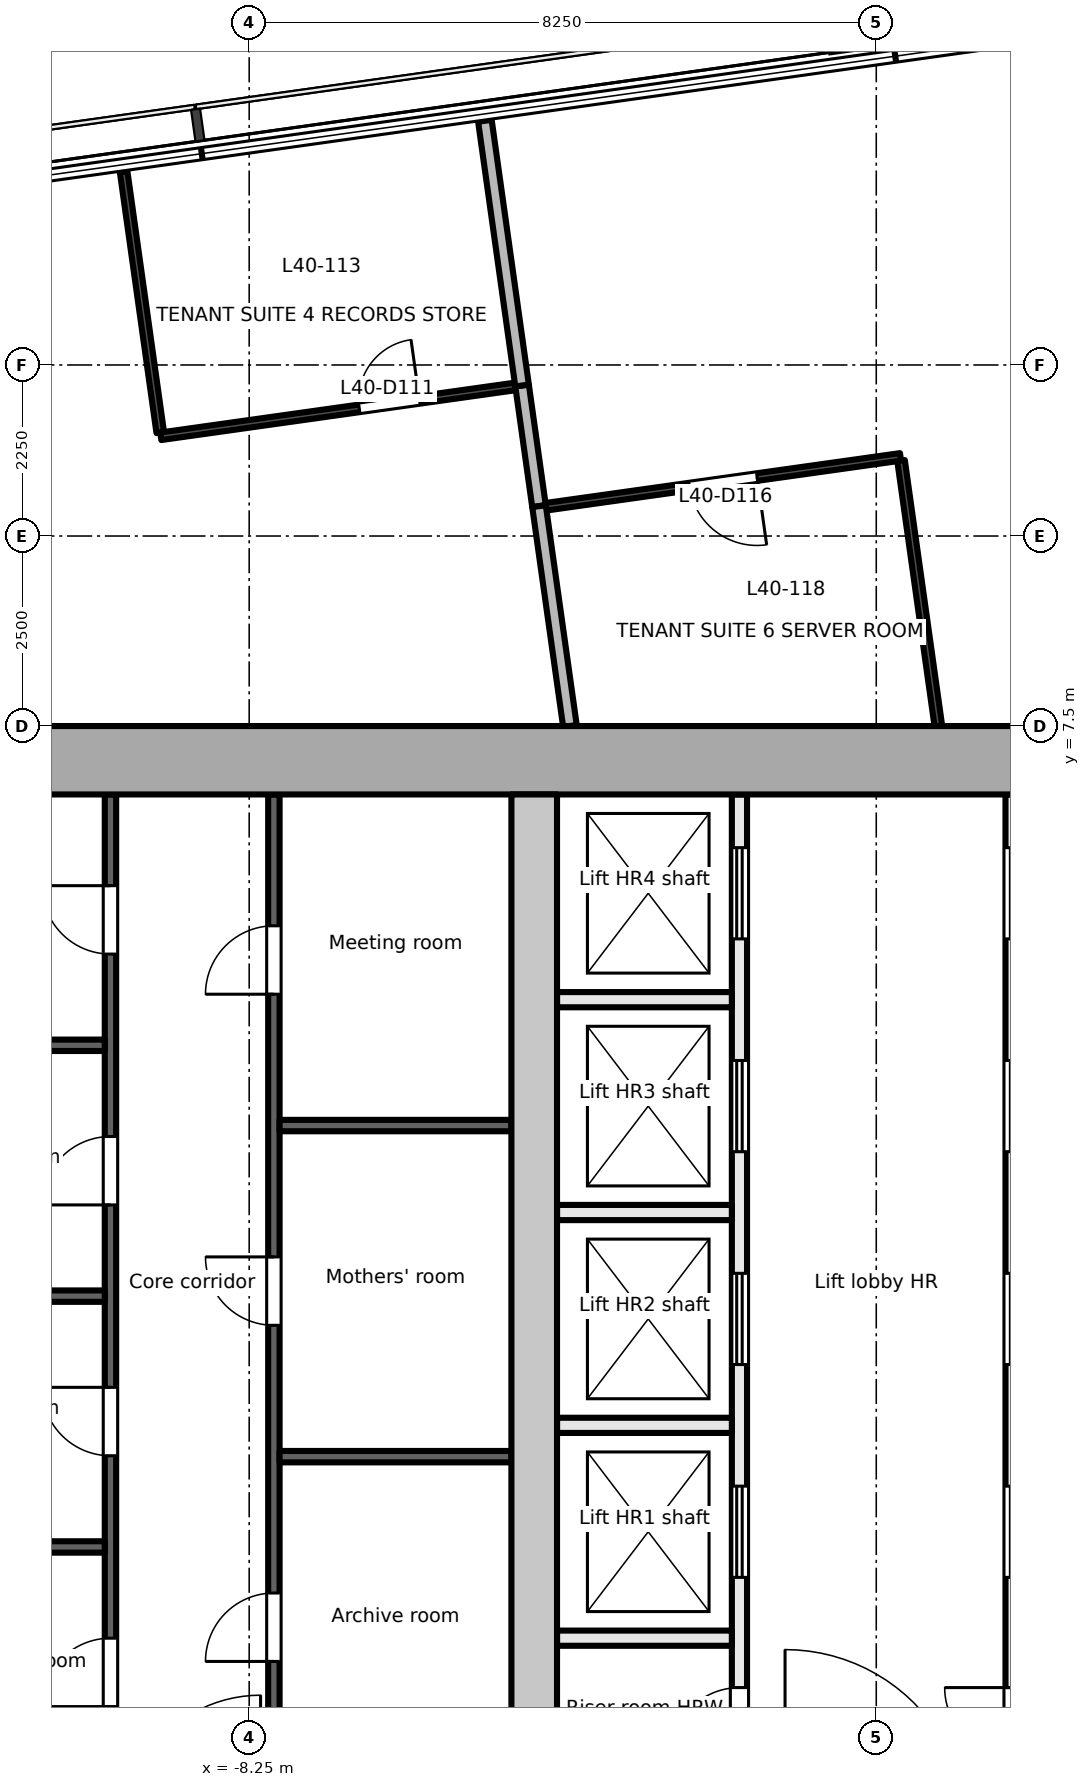
"""IFC4 building model, lengths in metres.
Left out: names, types, materials, properties, quantities, classifications, styles, units other than length and angle.
Written with IfcOpenShell. Run it as: python <this file> out.ifc"""

import sys

from ifc_helpers import new_model, si_unit, direction, frame, frame_2d, origin, origin_2d, place, context, subcontext, project, spatial, rectangle, extrude, element, fill, save


model = new_model("IFC4")
c1 = context("Model", 3, precision=1e-05, world=origin(), true_north=direction((0.0, 1.0)))
c2 = subcontext(c1, "Body", "Model", "MODEL_VIEW")
j1 = project(units=[si_unit("LENGTHUNIT", "METRE"), si_unit("PLANEANGLEUNIT", "RADIAN")], contexts=[c1])
p1 = place(None, origin())
s1 = spatial("IfcSite", under=j1, at=p1, CompositionType="ELEMENT")
p2 = place(p1, origin())
s2 = spatial("IfcBuilding", under=s1, at=p2, CompositionType="ELEMENT")
p3 = place(p2, frame((0.0, 0.0, 176.3)))
s3 = spatial("IfcBuildingStorey", under=s2, at=p3, CompositionType="ELEMENT", Elevation=176.3)
p4 = place(p3, frame((-0.125, 17.34, -0.2), z_axis=(0.0, 0.0, 1.0), x_axis=(0.99027049762, 0.139155817501, 0.0)))
e1 = element("IfcColumn", 1, at=p4, inside=s3, PredefinedType="COLUMN", context=c2, shape_type="SweptSolid", body=[
    extrude(rectangle(XDim=1.2, YDim=1.8, at=origin_2d()), origin(), (0.0, 0.0, 1.0), 3.9),
])
p5 = place(p3, frame((-18.0, 7.05, -0.2), z_axis=(0.0, 0.0, 1.0), x_axis=(1.0, 0.0, 0.0)))
e2 = element("IfcWall", 2, at=p5, inside=s3, PredefinedType="SHEAR", context=c2, shape_type="SweptSolid", body=[
    extrude(rectangle(XDim=36.0, YDim=0.9, at=frame_2d((18.0, 0.0))), origin(), (0.0, 0.0, 1.0), 3.9),
])
p6 = place(p3, frame((-4.5, -6.6, -0.2), z_axis=(0.0, 0.0, 1.0), x_axis=(0.0, 1.0, 0.0)))
e3 = element("IfcWall", 3, at=p6, inside=s3, PredefinedType="SHEAR", context=c2, shape_type="SweptSolid", body=[
    extrude(rectangle(XDim=13.2, YDim=0.6, at=frame_2d((6.6, 0.0))), origin(), (0.0, 0.0, 1.0), 3.9),
])
p7 = place(p3, frame((-10.075, -6.6, 0.0), z_axis=(0.0, 0.0, 1.0), x_axis=(0.0, 1.0, 0.0)))
e4 = element("IfcWall", 4, at=p7, inside=s3, PredefinedType="PARTITIONING", context=c2, shape_type="SweptSolid", body=[
    extrude(rectangle(XDim=13.2, YDim=0.15, at=frame_2d((6.6, 0.0))), origin(), (0.0, 0.0, 1.0), 3.7),
])
p8 = place(p7, frame((1.2, 0.0, 0.0)))
e5 = element("IfcOpeningElement", 5, at=p8, cuts=e4, PredefinedType="OPENING", context=c2, shape_type="SweptSolid", body=[
    extrude(rectangle(XDim=0.9, YDim=2.1, at=frame_2d((0.45, 1.05))), frame((0.0, 0.085, 0.0), z_axis=(0.0, -1.0, 0.0), x_axis=(1.0, 0.0, 0.0)), (0.0, 0.0, 1.0), 0.171),
])
p9 = place(p7, frame((4.5, 0.0, 0.0)))
e6 = element("IfcOpeningElement", 6, at=p9, cuts=e4, PredefinedType="OPENING", context=c2, shape_type="SweptSolid", body=[
    extrude(rectangle(XDim=0.9, YDim=2.1, at=frame_2d((0.45, 1.05))), frame((0.0, 0.085, 0.0), z_axis=(0.0, -1.0, 0.0), x_axis=(1.0, 0.0, 0.0)), (0.0, 0.0, 1.0), 0.171),
])
p10 = place(p7, frame((7.8, 0.0, 0.0)))
e7 = element("IfcOpeningElement", 7, at=p10, cuts=e4, PredefinedType="OPENING", context=c2, shape_type="SweptSolid", body=[
    extrude(rectangle(XDim=0.9, YDim=2.1, at=frame_2d((0.45, 1.05))), frame((0.0, 0.085, 0.0), z_axis=(0.0, -1.0, 0.0), x_axis=(1.0, 0.0, 0.0)), (0.0, 0.0, 1.0), 0.171),
])
p11 = place(p7, frame((11.1, 0.0, 0.0)))
e8 = element("IfcOpeningElement", 8, at=p11, cuts=e4, PredefinedType="OPENING", context=c2, shape_type="SweptSolid", body=[
    extrude(rectangle(XDim=0.9, YDim=2.1, at=frame_2d((0.45, 1.05))), frame((0.0, 0.085, 0.0), z_axis=(0.0, -1.0, 0.0), x_axis=(1.0, 0.0, 0.0)), (0.0, 0.0, 1.0), 0.171),
])
for number, where, z_axis, x_axis in (
    (9, (-13.2, -3.3, 0.0), (0.0, 0.0, 1.0), (1.0, 0.0, 0.0)),
    (10, (-13.2, 0.0, 0.0), (0.0, 0.0, 1.0), (1.0, 0.0, 0.0)),
    (11, (-13.2, 3.3, 0.0), (0.0, 0.0, 1.0), (1.0, 0.0, 0.0)),
):
    element("IfcWall", number, at=place(p3, frame(where, z_axis=z_axis, x_axis=x_axis)), inside=s3, PredefinedType="PARTITIONING", context=c2, shape_type="SweptSolid", body=[
        extrude(rectangle(XDim=3.05, YDim=0.15, at=frame_2d((1.525, 0.0))), origin(), (0.0, 0.0, 1.0), 3.7),
    ])
p12 = place(p3, frame((-7.925, -6.6, 0.0), z_axis=(0.0, 0.0, 1.0), x_axis=(0.0, 1.0, 0.0)))
e12 = element("IfcWall", 12, at=p12, inside=s3, PredefinedType="PARTITIONING", context=c2, shape_type="SweptSolid", body=[
    extrude(rectangle(XDim=13.2, YDim=0.15, at=frame_2d((6.6, 0.0))), origin(), (0.0, 0.0, 1.0), 3.7),
])
p13 = place(p12, frame((1.794, 0.0, 0.0)))
e13 = element("IfcOpeningElement", 13, at=p13, cuts=e12, PredefinedType="OPENING", context=c2, shape_type="SweptSolid", body=[
    extrude(rectangle(XDim=0.9, YDim=2.1, at=frame_2d((0.45, 1.05))), frame((0.0, 0.085, 0.0), z_axis=(0.0, -1.0, 0.0), x_axis=(1.0, 0.0, 0.0)), (0.0, 0.0, 1.0), 0.171),
])
p14 = place(p12, frame((6.216, 0.0, 0.0)))
e14 = element("IfcOpeningElement", 14, at=p14, cuts=e12, PredefinedType="OPENING", context=c2, shape_type="SweptSolid", body=[
    extrude(rectangle(XDim=0.9, YDim=2.1, at=frame_2d((0.45, 1.05))), frame((0.0, 0.085, 0.0), z_axis=(0.0, -1.0, 0.0), x_axis=(1.0, 0.0, 0.0)), (0.0, 0.0, 1.0), 0.171),
])
p15 = place(p12, frame((10.572, 0.0, 0.0)))
e15 = element("IfcOpeningElement", 15, at=p15, cuts=e12, PredefinedType="OPENING", context=c2, shape_type="SweptSolid", body=[
    extrude(rectangle(XDim=0.9, YDim=2.1, at=frame_2d((0.45, 1.05))), frame((0.0, 0.085, 0.0), z_axis=(0.0, -1.0, 0.0), x_axis=(1.0, 0.0, 0.0)), (0.0, 0.0, 1.0), 0.171),
])
for number, where, z_axis, x_axis in (
    (16, (-7.85, -2.112, 0.0), (0.0, 0.0, 1.0), (1.0, 0.0, 0.0)),
    (17, (-7.85, 2.244, 0.0), (0.0, 0.0, 1.0), (1.0, 0.0, 0.0)),
):
    element("IfcWall", number, at=place(p3, frame(where, z_axis=z_axis, x_axis=x_axis)), inside=s3, PredefinedType="PARTITIONING", context=c2, shape_type="SweptSolid", body=[
        extrude(rectangle(XDim=3.05, YDim=0.15, at=frame_2d((1.525, 0.0))), origin(), (0.0, 0.0, 1.0), 3.7),
    ])
p16 = place(p3, frame((-1.8, -6.6, 0.0), z_axis=(0.0, 0.0, 1.0), x_axis=(0.0, 1.0, 0.0)))
e18 = element("IfcWall", 18, at=p16, inside=s3, PredefinedType="PARTITIONING", context=c2, shape_type="SweptSolid", body=[
    extrude(rectangle(XDim=13.2, YDim=0.2, at=frame_2d((6.6, 0.0))), origin(), (0.0, 0.0, 1.0), 3.7),
])
p17 = place(p16, frame((0.55, 0.0, 0.0)))
e19 = element("IfcOpeningElement", 19, at=p17, cuts=e18, PredefinedType="OPENING", context=c2, shape_type="SweptSolid", body=[
    extrude(rectangle(XDim=0.9, YDim=2.1, at=frame_2d((0.45, 1.05))), frame((0.0, 0.111, 0.0), z_axis=(0.0, -1.0, 0.0), x_axis=(1.0, 0.0, 0.0)), (0.0, 0.0, 1.0), 0.221),
])
p18 = place(p16, frame((2.9, 0.0, 0.0)))
e20 = element("IfcOpeningElement", 20, at=p18, cuts=e18, PredefinedType="OPENING", context=c2, shape_type="SweptSolid", body=[
    extrude(rectangle(XDim=1.2, YDim=2.1, at=frame_2d((0.6, 1.05))), frame((0.0, 0.111, 0.0), z_axis=(0.0, -1.0, 0.0), x_axis=(1.0, 0.0, 0.0)), (0.0, 0.0, 1.0), 0.221),
])
p19 = place(p16, frame((5.7, 0.0, 0.0)))
e21 = element("IfcOpeningElement", 21, at=p19, cuts=e18, PredefinedType="OPENING", context=c2, shape_type="SweptSolid", body=[
    extrude(rectangle(XDim=1.2, YDim=2.1, at=frame_2d((0.6, 1.05))), frame((0.0, 0.111, 0.0), z_axis=(0.0, -1.0, 0.0), x_axis=(1.0, 0.0, 0.0)), (0.0, 0.0, 1.0), 0.221),
])
p20 = place(p16, frame((8.5, 0.0, 0.0)))
e22 = element("IfcOpeningElement", 22, at=p20, cuts=e18, PredefinedType="OPENING", context=c2, shape_type="SweptSolid", body=[
    extrude(rectangle(XDim=1.2, YDim=2.1, at=frame_2d((0.6, 1.05))), frame((0.0, 0.111, 0.0), z_axis=(0.0, -1.0, 0.0), x_axis=(1.0, 0.0, 0.0)), (0.0, 0.0, 1.0), 0.221),
])
p21 = place(p16, frame((11.3, 0.0, 0.0)))
e23 = element("IfcOpeningElement", 23, at=p21, cuts=e18, PredefinedType="OPENING", context=c2, shape_type="SweptSolid", body=[
    extrude(rectangle(XDim=1.2, YDim=2.1, at=frame_2d((0.6, 1.05))), frame((0.0, 0.111, 0.0), z_axis=(0.0, -1.0, 0.0), x_axis=(1.0, 0.0, 0.0)), (0.0, 0.0, 1.0), 0.221),
])
p22 = place(p3, frame((1.8, -6.6, 0.0), z_axis=(0.0, 0.0, 1.0), x_axis=(0.0, 1.0, 0.0)))
e24 = element("IfcWall", 24, at=p22, inside=s3, PredefinedType="PARTITIONING", context=c2, shape_type="SweptSolid", body=[
    extrude(rectangle(XDim=13.2, YDim=0.2, at=frame_2d((6.6, 0.0))), origin(), (0.0, 0.0, 1.0), 3.7),
])
p23 = place(p22, frame((0.55, 0.0, 0.0)))
e25 = element("IfcOpeningElement", 25, at=p23, cuts=e24, PredefinedType="OPENING", context=c2, shape_type="SweptSolid", body=[
    extrude(rectangle(XDim=0.9, YDim=2.1, at=frame_2d((0.45, 1.05))), frame((0.0, 0.111, 0.0), z_axis=(0.0, -1.0, 0.0), x_axis=(1.0, 0.0, 0.0)), (0.0, 0.0, 1.0), 0.221),
])
p24 = place(p22, frame((2.9, 0.0, 0.0)))
e26 = element("IfcOpeningElement", 26, at=p24, cuts=e24, PredefinedType="OPENING", context=c2, shape_type="SweptSolid", body=[
    extrude(rectangle(XDim=1.2, YDim=2.1, at=frame_2d((0.6, 1.05))), frame((0.0, 0.111, 0.0), z_axis=(0.0, -1.0, 0.0), x_axis=(1.0, 0.0, 0.0)), (0.0, 0.0, 1.0), 0.221),
])
p25 = place(p22, frame((5.7, 0.0, 0.0)))
e27 = element("IfcOpeningElement", 27, at=p25, cuts=e24, PredefinedType="OPENING", context=c2, shape_type="SweptSolid", body=[
    extrude(rectangle(XDim=1.2, YDim=2.1, at=frame_2d((0.6, 1.05))), frame((0.0, 0.111, 0.0), z_axis=(0.0, -1.0, 0.0), x_axis=(1.0, 0.0, 0.0)), (0.0, 0.0, 1.0), 0.221),
])
p26 = place(p22, frame((8.5, 0.0, 0.0)))
e28 = element("IfcOpeningElement", 28, at=p26, cuts=e24, PredefinedType="OPENING", context=c2, shape_type="SweptSolid", body=[
    extrude(rectangle(XDim=1.2, YDim=2.1, at=frame_2d((0.6, 1.05))), frame((0.0, 0.111, 0.0), z_axis=(0.0, -1.0, 0.0), x_axis=(1.0, 0.0, 0.0)), (0.0, 0.0, 1.0), 0.221),
])
p27 = place(p22, frame((11.3, 0.0, 0.0)))
e29 = element("IfcOpeningElement", 29, at=p27, cuts=e24, PredefinedType="OPENING", context=c2, shape_type="SweptSolid", body=[
    extrude(rectangle(XDim=1.2, YDim=2.1, at=frame_2d((0.6, 1.05))), frame((0.0, 0.111, 0.0), z_axis=(0.0, -1.0, 0.0), x_axis=(1.0, 0.0, 0.0)), (0.0, 0.0, 1.0), 0.221),
])
for number, where, z_axis, x_axis in (
    (30, (-4.2, -1.7, 0.0), (0.0, 0.0, 1.0), (1.0, 0.0, 0.0)),
    (31, (-4.2, 1.1, 0.0), (0.0, 0.0, 1.0), (1.0, 0.0, 0.0)),
    (32, (-4.2, 3.9, 0.0), (0.0, 0.0, 1.0), (1.0, 0.0, 0.0)),
    (33, (-4.2, -4.5, 0.0), (0.0, 0.0, 1.0), (1.0, 0.0, 0.0)),
):
    element("IfcWall", number, at=place(p3, frame(where, z_axis=z_axis, x_axis=x_axis)), inside=s3, PredefinedType="PARTITIONING", context=c2, shape_type="SweptSolid", body=[
        extrude(rectangle(XDim=2.3, YDim=0.2, at=frame_2d((1.15, 0.0))), origin(), (0.0, 0.0, 1.0), 3.7),
    ])
p28 = place(p3, frame((-9.902, 14.794, 0.0), z_axis=(0.0, 0.0, 1.0), x_axis=(0.139094045424, -0.990279176055, 0.0)))
e34 = element("IfcWall", 34, at=p28, inside=s3, PredefinedType="PARTITIONING", context=c2, shape_type="SweptSolid", body=[
    extrude(rectangle(XDim=3.467, YDim=0.1, at=frame_2d((1.733, 0.0))), origin(), (0.0, 0.0, 1.0), 3.7),
])
p29 = place(p3, frame((-9.413, 11.312, 0.0), z_axis=(0.0, 0.0, 1.0), x_axis=(0.99025300455, 0.139280246191, 0.0)))
e35 = element("IfcWall", 35, at=p29, inside=s3, PredefinedType="PARTITIONING", context=c2, shape_type="SweptSolid", body=[
    extrude(rectangle(XDim=4.71, YDim=0.1, at=frame_2d((2.355, 0.0))), origin(), (0.0, 0.0, 1.0), 3.3),
])
p30 = place(p29, frame((2.637, 0.0, 0.0)))
e36 = element("IfcOpeningElement", 36, at=p30, cuts=e35, PredefinedType="OPENING", context=c2, shape_type="SweptSolid", body=[
    extrude(rectangle(XDim=0.8, YDim=2.1, at=frame_2d((0.4, 1.05))), frame((0.0, 0.061, 0.0), z_axis=(0.0, -1.0, 0.0), x_axis=(1.0, 0.0, 0.0)), (0.0, 0.0, 1.0), 0.121),
])
p31 = place(p3, frame((-4.66, 11.98, 0.0), z_axis=(0.0, 0.0, 1.0), x_axis=(0.139096096116, -0.990278888013, 0.0)))
e37 = element("IfcWall", 37, at=p31, inside=s3, PredefinedType="PARTITIONING", context=c2, shape_type="SweptSolid", body=[
    extrude(rectangle(XDim=1.603, YDim=0.18, at=frame_2d((0.801, 0.0))), origin(), (0.0, 0.0, 1.0), 3.25),
])
p32 = place(p3, frame((-4.437, 10.393, 0.0), z_axis=(0.0, 0.0, 1.0), x_axis=(0.139303486007, -0.990249735565, 0.0)))
e38 = element("IfcWall", 38, at=p32, inside=s3, PredefinedType="PARTITIONING", context=c2, shape_type="SweptSolid", body=[
    extrude(rectangle(XDim=2.922, YDim=0.18, at=frame_2d((1.461, 0.0))), origin(), (0.0, 0.0, 1.0), 3.25),
])
p33 = place(p3, frame((-5.149, 15.463, 0.0), z_axis=(0.0, 0.0, 1.0), x_axis=(0.139039982937, -0.990286768136, 0.0)))
e39 = element("IfcWall", 39, at=p33, inside=s3, PredefinedType="PARTITIONING", context=c2, shape_type="SweptSolid", body=[
    extrude(rectangle(XDim=3.517, YDim=0.18, at=frame_2d((1.759, 0.0))), origin(), (0.0, 0.0, 1.0), 3.25),
])
p34 = place(p3, frame((0.319, 11.041, 0.0), z_axis=(0.0, 0.0, 1.0), x_axis=(-0.99025300455, -0.139280246191, 0.0)))
e40 = element("IfcWall", 40, at=p34, inside=s3, PredefinedType="PARTITIONING", context=c2, shape_type="SweptSolid", body=[
    extrude(rectangle(XDim=4.71, YDim=0.1, at=frame_2d((2.355, 0.0))), origin(), (0.0, 0.0, 1.0), 3.25),
])
p35 = place(p34, frame((1.905, 0.0, 0.0)))
e41 = element("IfcOpeningElement", 41, at=p35, cuts=e40, PredefinedType="OPENING", context=c2, shape_type="SweptSolid", body=[
    extrude(rectangle(XDim=0.9, YDim=2.1, at=frame_2d((0.45, 1.05))), frame((0.0, 0.061, 0.0), z_axis=(0.0, -1.0, 0.0), x_axis=(1.0, 0.0, 0.0)), (0.0, 0.0, 1.0), 0.121),
])
p36 = place(p3, frame((0.817, 7.5, 0.0), z_axis=(0.0, 0.0, 1.0), x_axis=(-0.139230432727, 0.990260009595, 0.0)))
e42 = element("IfcWall", 42, at=p36, inside=s3, PredefinedType="PARTITIONING", context=c2, shape_type="SweptSolid", body=[
    extrude(rectangle(XDim=3.526, YDim=0.1, at=frame_2d((1.763, 0.0))), origin(), (0.0, 0.0, 1.0), 3.7),
])
p37 = place(p8, origin())
e43 = element("IfcDoor", 43, at=p37, inside=s3, OperationType="SINGLE_SWING_LEFT", PredefinedType="DOOR", context=c2, shape_type="SweptSolid", body=[
    extrude(rectangle(XDim=0.9, YDim=2.1, at=frame_2d((0.45, 1.05))), frame((0.0, 0.025, 0.0), z_axis=(0.0, -1.0, 0.0), x_axis=(1.0, 0.0, 0.0)), (0.0, 0.0, 1.0), 0.05),
])
fill(e5, e43)
p38 = place(p9, origin())
e44 = element("IfcDoor", 44, at=p38, inside=s3, OperationType="SINGLE_SWING_RIGHT", PredefinedType="DOOR", context=c2, shape_type="SweptSolid", body=[
    extrude(rectangle(XDim=0.9, YDim=2.1, at=frame_2d((0.45, 1.05))), frame((0.0, 0.025, 0.0), z_axis=(0.0, -1.0, 0.0), x_axis=(1.0, 0.0, 0.0)), (0.0, 0.0, 1.0), 0.05),
])
fill(e6, e44)
p39 = place(p10, origin())
e45 = element("IfcDoor", 45, at=p39, inside=s3, OperationType="SINGLE_SWING_LEFT", PredefinedType="DOOR", context=c2, shape_type="SweptSolid", body=[
    extrude(rectangle(XDim=0.9, YDim=2.1, at=frame_2d((0.45, 1.05))), frame((0.0, 0.025, 0.0), z_axis=(0.0, -1.0, 0.0), x_axis=(1.0, 0.0, 0.0)), (0.0, 0.0, 1.0), 0.05),
])
fill(e7, e45)
p40 = place(p11, origin())
e46 = element("IfcDoor", 46, at=p40, inside=s3, OperationType="SINGLE_SWING_RIGHT", PredefinedType="DOOR", context=c2, shape_type="SweptSolid", body=[
    extrude(rectangle(XDim=0.9, YDim=2.1, at=frame_2d((0.45, 1.05))), frame((0.0, 0.025, 0.0), z_axis=(0.0, -1.0, 0.0), x_axis=(1.0, 0.0, 0.0)), (0.0, 0.0, 1.0), 0.05),
])
fill(e8, e46)
p41 = place(p13, origin())
e47 = element("IfcDoor", 47, at=p41, inside=s3, OperationType="SINGLE_SWING_LEFT", PredefinedType="DOOR", context=c2, shape_type="SweptSolid", body=[
    extrude(rectangle(XDim=0.9, YDim=2.1, at=frame_2d((0.45, 1.05))), frame((0.0, 0.025, 0.0), z_axis=(0.0, -1.0, 0.0), x_axis=(1.0, 0.0, 0.0)), (0.0, 0.0, 1.0), 0.05),
])
fill(e13, e47)
p42 = place(p14, origin())
e48 = element("IfcDoor", 48, at=p42, inside=s3, OperationType="SINGLE_SWING_RIGHT", PredefinedType="DOOR", context=c2, shape_type="SweptSolid", body=[
    extrude(rectangle(XDim=0.9, YDim=2.1, at=frame_2d((0.45, 1.05))), frame((0.0, 0.025, 0.0), z_axis=(0.0, -1.0, 0.0), x_axis=(1.0, 0.0, 0.0)), (0.0, 0.0, 1.0), 0.05),
])
fill(e14, e48)
p43 = place(p15, origin())
e49 = element("IfcDoor", 49, at=p43, inside=s3, OperationType="SINGLE_SWING_LEFT", PredefinedType="DOOR", context=c2, shape_type="SweptSolid", body=[
    extrude(rectangle(XDim=0.9, YDim=2.1, at=frame_2d((0.45, 1.05))), frame((0.0, 0.025, 0.0), z_axis=(0.0, -1.0, 0.0), x_axis=(1.0, 0.0, 0.0)), (0.0, 0.0, 1.0), 0.05),
])
fill(e15, e49)
p44 = place(p17, origin())
e50 = element("IfcDoor", 50, at=p44, inside=s3, OperationType="SINGLE_SWING_LEFT", PredefinedType="DOOR", context=c2, shape_type="SweptSolid", body=[
    extrude(rectangle(XDim=0.9, YDim=2.1, at=frame_2d((0.45, 1.05))), frame((0.0, 0.025, 0.0), z_axis=(0.0, -1.0, 0.0), x_axis=(1.0, 0.0, 0.0)), (0.0, 0.0, 1.0), 0.05),
])
fill(e19, e50)
p45 = place(p18, origin())
e51 = element("IfcDoor", 51, at=p45, inside=s3, OperationType="DOUBLE_DOOR_SLIDING", PredefinedType="DOOR", context=c2, shape_type="SweptSolid", body=[
    extrude(rectangle(XDim=1.2, YDim=2.1, at=frame_2d((0.6, 1.05))), frame((0.0, 0.025, 0.0), z_axis=(0.0, -1.0, 0.0), x_axis=(1.0, 0.0, 0.0)), (0.0, 0.0, 1.0), 0.05),
])
fill(e20, e51)
p46 = place(p19, origin())
e52 = element("IfcDoor", 52, at=p46, inside=s3, OperationType="DOUBLE_DOOR_SLIDING", PredefinedType="DOOR", context=c2, shape_type="SweptSolid", body=[
    extrude(rectangle(XDim=1.2, YDim=2.1, at=frame_2d((0.6, 1.05))), frame((0.0, 0.025, 0.0), z_axis=(0.0, -1.0, 0.0), x_axis=(1.0, 0.0, 0.0)), (0.0, 0.0, 1.0), 0.05),
])
fill(e21, e52)
p47 = place(p20, origin())
e53 = element("IfcDoor", 53, at=p47, inside=s3, OperationType="DOUBLE_DOOR_SLIDING", PredefinedType="DOOR", context=c2, shape_type="SweptSolid", body=[
    extrude(rectangle(XDim=1.2, YDim=2.1, at=frame_2d((0.6, 1.05))), frame((0.0, 0.025, 0.0), z_axis=(0.0, -1.0, 0.0), x_axis=(1.0, 0.0, 0.0)), (0.0, 0.0, 1.0), 0.05),
])
fill(e22, e53)
p48 = place(p21, origin())
e54 = element("IfcDoor", 54, at=p48, inside=s3, OperationType="DOUBLE_DOOR_SLIDING", PredefinedType="DOOR", context=c2, shape_type="SweptSolid", body=[
    extrude(rectangle(XDim=1.2, YDim=2.1, at=frame_2d((0.6, 1.05))), frame((0.0, 0.025, 0.0), z_axis=(0.0, -1.0, 0.0), x_axis=(1.0, 0.0, 0.0)), (0.0, 0.0, 1.0), 0.05),
])
fill(e23, e54)
p49 = place(p30, origin())
e55 = element("IfcDoor", 55, at=p49, inside=s3, OperationType="SINGLE_SWING_RIGHT", PredefinedType="DOOR", context=c2, shape_type="SweptSolid", body=[
    extrude(rectangle(XDim=0.8, YDim=2.1, at=frame_2d((0.4, 1.05))), frame((0.0, 0.025, 0.0), z_axis=(0.0, -1.0, 0.0), x_axis=(1.0, 0.0, 0.0)), (0.0, 0.0, 1.0), 0.05),
])
fill(e36, e55)
p50 = place(p35, origin())
e56 = element("IfcDoor", 56, at=p50, inside=s3, OperationType="SINGLE_SWING_LEFT", PredefinedType="DOOR", context=c2, shape_type="SweptSolid", body=[
    extrude(rectangle(XDim=0.9, YDim=2.1, at=frame_2d((0.45, 1.05))), frame((0.0, 0.025, 0.0), z_axis=(0.0, -1.0, 0.0), x_axis=(1.0, 0.0, 0.0)), (0.0, 0.0, 1.0), 0.05),
])
fill(e41, e56)
save(model, sys.argv[1])
